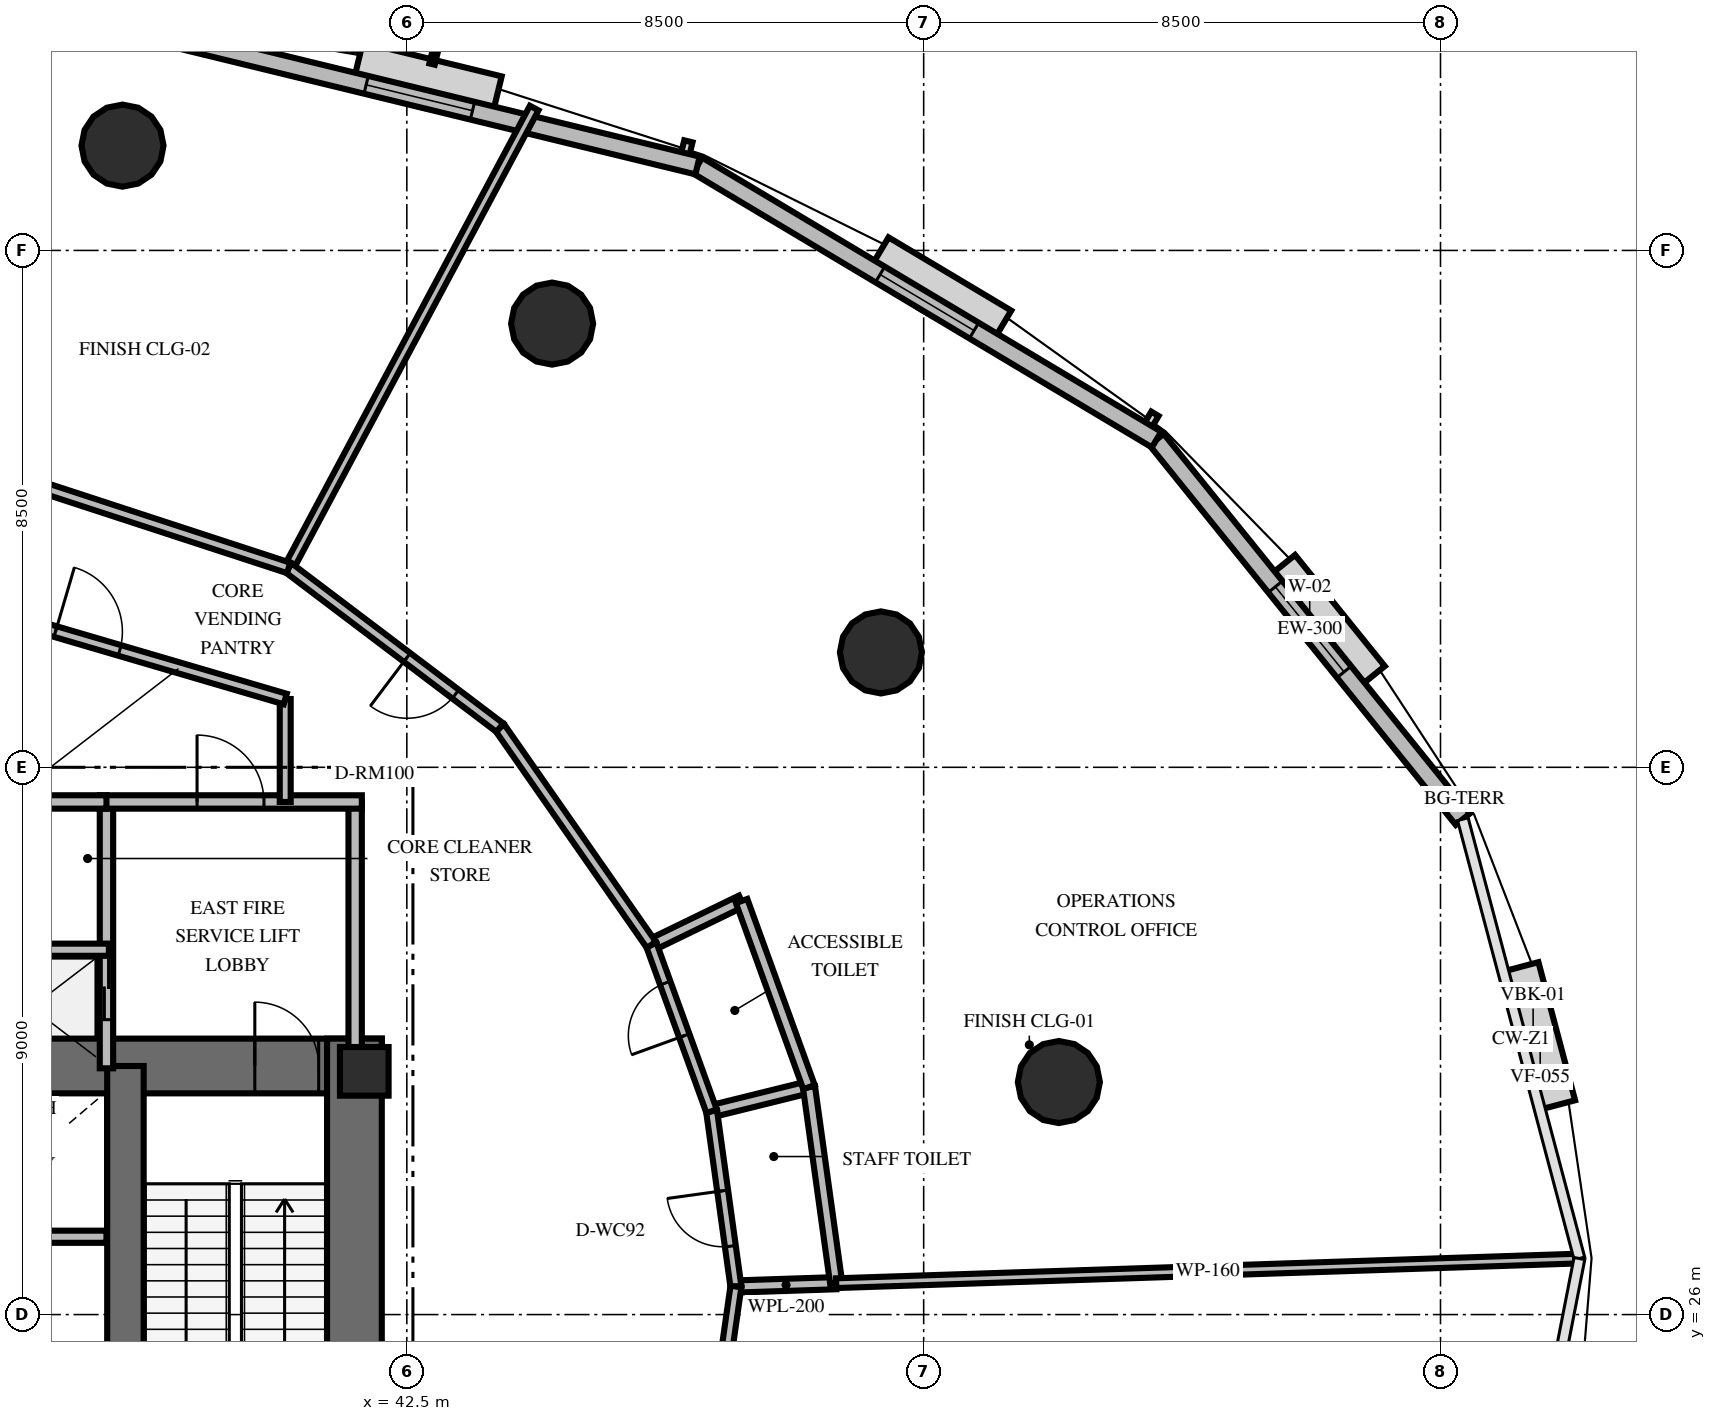
"""IFC4 building model, lengths in metres.
Left out: names, types, materials, properties, quantities, classifications, styles, units other than length and angle.
Written with IfcOpenShell. Run it as: python <this file> out.ifc"""

import sys

from ifc_helpers import new_model, si_unit, direction, frame, frame_2d, origin, origin_2d, place, context, subcontext, project, spatial, rectangle, circle, extrude, element, fill, save


model = new_model("IFC4")
c1 = context("Model", 3, precision=1e-05, world=origin(), true_north=direction((0.0, 1.0)))
c2 = subcontext(c1, "Body", "Model", "MODEL_VIEW")
j1 = project(units=[si_unit("LENGTHUNIT", "METRE"), si_unit("PLANEANGLEUNIT", "RADIAN")], contexts=[c1])
p1 = place(None, origin())
s1 = spatial("IfcSite", under=j1, at=p1, CompositionType="ELEMENT")
p2 = place(p1, origin())
s2 = spatial("IfcBuilding", under=s1, at=p2, CompositionType="ELEMENT")
p3 = place(p2, frame((0.0, 0.0, 38.4)))
s3 = spatial("IfcBuildingStorey", under=s2, at=p3, CompositionType="ELEMENT", Elevation=38.4)
p4 = place(p3, frame((25.922, 30.088, 0.0), z_axis=(0.0, 0.0, 1.0), x_axis=(1.0, 0.0, 0.0)))
e1 = element("IfcWall", 1, at=p4, inside=s3, PredefinedType="SHEAR", context=c2, shape_type="SweptSolid", body=[
    extrude(rectangle(XDim=16.166, YDim=0.9, at=frame_2d((8.083, 0.0))), origin(), (0.0, 0.0, 1.0), 4.2),
])
p5 = place(p4, frame((1.028, 0.0, 0.0)))
e2 = element("IfcOpeningElement", 2, at=p5, cuts=e1, PredefinedType="OPENING", context=c2, shape_type="SweptSolid", body=[
    extrude(rectangle(XDim=1.05, YDim=2.15, at=frame_2d((0.525, 1.075))), frame((0.0, 0.46, 0.0), z_axis=(0.0, -1.0, 0.0), x_axis=(1.0, 0.0, 0.0)), (0.0, 0.0, 1.0), 0.92),
])
p6 = place(p4, frame((14.078, 0.0, 0.0)))
e3 = element("IfcOpeningElement", 3, at=p6, cuts=e1, PredefinedType="OPENING", context=c2, shape_type="SweptSolid", body=[
    extrude(rectangle(XDim=1.05, YDim=2.15, at=frame_2d((0.525, 1.075))), frame((0.0, 0.46, 0.0), z_axis=(0.0, -1.0, 0.0), x_axis=(1.0, 0.0, 0.0)), (0.0, 0.0, 1.0), 0.92),
])
p7 = place(p4, frame((7.528, 0.0, 0.0)))
e4 = element("IfcOpeningElement", 4, at=p7, cuts=e1, PredefinedType="OPENING", context=c2, shape_type="SweptSolid", body=[
    extrude(rectangle(XDim=1.1, YDim=2.15, at=frame_2d((0.55, 1.075))), frame((0.0, 0.46, 0.0), z_axis=(0.0, -1.0, 0.0), x_axis=(1.0, 0.0, 0.0)), (0.0, 0.0, 1.0), 0.92),
])
p8 = place(p3, frame((41.638, 19.662, 0.0), z_axis=(0.0, 0.0, 1.0), x_axis=(0.0, 1.0, 0.0)))
e5 = element("IfcWall", 5, at=p8, inside=s3, PredefinedType="SHEAR", context=c2, shape_type="SweptSolid", body=[
    extrude(rectangle(XDim=10.876, YDim=0.9, at=frame_2d((5.438, 0.0))), origin(), (0.0, 0.0, 1.0), 4.2),
])
p9 = place(p3, frame((37.872, 20.112, 0.0), z_axis=(0.0, 0.0, 1.0), x_axis=(0.0, 1.0, 0.0)))
e6 = element("IfcWall", 6, at=p9, inside=s3, PredefinedType="SHEAR", context=c2, shape_type="SweptSolid", body=[
    extrude(rectangle(XDim=9.976, YDim=0.6, at=frame_2d((4.988, 0.0))), origin(), (0.0, 0.0, 1.0), 4.2),
])
p10 = place(p3, frame((41.8, 30.0, 0.0), z_axis=(0.0, 0.0, 1.0), x_axis=(1.0, 0.0, 0.0)))
e7 = element("IfcColumn", 7, at=p10, inside=s3, PredefinedType="PILASTER", context=c2, shape_type="SweptSolid", body=[
    extrude(rectangle(XDim=0.8, YDim=0.8, at=origin_2d()), origin(), (0.0, 0.0, 1.0), 4.2),
])
for number, where, z_axis, x_axis in (
    (8, (53.223, 29.824, 0.0), (0.0, 0.0, 1.0), (1.0, 0.0, 0.0)),
    (9, (50.297, 36.889, 0.0), (0.0, 0.0, 1.0), (1.0, 0.0, 0.0)),
    (10, (44.889, 42.297, 0.0), (0.0, 0.0, 1.0), (1.0, 0.0, 0.0)),
    (11, (37.824, 45.223, 0.0), (0.0, 0.0, 1.0), (1.0, 0.0, 0.0)),
):
    element("IfcColumn", number, at=place(p3, frame(where, z_axis=z_axis, x_axis=x_axis)), inside=s3, PredefinedType="COLUMN", context=c2, shape_type="SweptSolid", body=[
        extrude(circle(Radius=0.675, at=origin_2d()), origin(), (0.0, 0.0, 1.0), 4.2),
    ])
p11 = place(p3, frame((59.868, 34.147, 0.0), z_axis=(0.0, 0.0, 1.0), x_axis=(-0.627974320343, 0.778234060543, 0.0)))
e12 = element("IfcWall", 12, at=p11, inside=s3, PredefinedType="SOLIDWALL", context=c2, shape_type="SweptSolid", body=[
    extrude(rectangle(XDim=8.021, YDim=0.3, at=frame_2d((4.011, 0.0))), origin(), (0.0, 0.0, 1.0), 3.0),
])
p12 = place(p11, frame((3.111, 0.0, 0.8)))
e13 = element("IfcOpeningElement", 13, at=p12, cuts=e12, PredefinedType="OPENING", context=c2, shape_type="SweptSolid", body=[
    extrude(rectangle(XDim=1.8, YDim=1.95, at=frame_2d((0.9, 0.975))), frame((0.0, 0.16, 0.0), z_axis=(0.0, -1.0, 0.0), x_axis=(1.0, 0.0, 0.0)), (0.0, 0.0, 1.0), 0.32),
])
p13 = place(p3, frame((54.83, 40.39, 0.0), z_axis=(0.0, 0.0, 1.0), x_axis=(-0.85861541015, 0.512620305345, 0.0)))
e14 = element("IfcWall", 14, at=p13, inside=s3, PredefinedType="SOLIDWALL", context=c2, shape_type="SweptSolid", body=[
    extrude(rectangle(XDim=8.793, YDim=0.3, at=frame_2d((4.396, 0.0))), origin(), (0.0, 0.0, 1.0), 3.0),
])
p14 = place(p13, frame((3.496, 0.0, 0.8)))
e15 = element("IfcOpeningElement", 15, at=p14, cuts=e14, PredefinedType="OPENING", context=c2, shape_type="SweptSolid", body=[
    extrude(rectangle(XDim=1.8, YDim=1.95, at=frame_2d((0.9, 0.975))), frame((0.0, 0.16, 0.0), z_axis=(0.0, -1.0, 0.0), x_axis=(1.0, 0.0, 0.0)), (0.0, 0.0, 1.0), 0.32),
])
p15 = place(p3, frame((47.281, 44.897, 0.0), z_axis=(0.0, 0.0, 1.0), x_axis=(-0.971624307671, 0.236529500787, 0.0)))
e16 = element("IfcWall", 16, at=p15, inside=s3, PredefinedType="SOLIDWALL", context=c2, shape_type="SweptSolid", body=[
    extrude(rectangle(XDim=9.419, YDim=0.3, at=frame_2d((4.709, 0.0))), origin(), (0.0, 0.0, 1.0), 3.0),
])
p16 = place(p15, frame((3.809, 0.0, 0.8)))
e17 = element("IfcOpeningElement", 17, at=p16, cuts=e16, PredefinedType="OPENING", context=c2, shape_type="SweptSolid", body=[
    extrude(rectangle(XDim=1.8, YDim=1.95, at=frame_2d((0.9, 0.975))), frame((0.0, 0.16, 0.0), z_axis=(0.0, -1.0, 0.0), x_axis=(1.0, 0.0, 0.0)), (0.0, 0.0, 1.0), 0.32),
])
p17 = place(p3, frame((38.129, 47.125, 0.0), z_axis=(0.0, 0.0, 1.0), x_axis=(-0.99944952804, -0.033175908432, 0.0)))
e18 = element("IfcWall", 18, at=p17, inside=s3, PredefinedType="SOLIDWALL", context=c2, shape_type="SweptSolid", body=[
    extrude(rectangle(XDim=9.655, YDim=0.3, at=frame_2d((4.828, 0.0))), origin(), (0.0, 0.0, 1.0), 3.0),
])
p18 = place(p17, frame((3.63, 0.0, 0.0)))
e19 = element("IfcOpeningElement", 19, at=p18, cuts=e18, PredefinedType="OPENING", context=c2, shape_type="SweptSolid", body=[
    extrude(rectangle(XDim=1.05, YDim=2.15, at=frame_2d((0.525, 1.075))), frame((0.0, 0.16, 0.0), z_axis=(0.0, -1.0, 0.0), x_axis=(1.0, 0.0, 0.0)), (0.0, 0.0, 1.0), 0.32),
])
p19 = place(p3, frame((37.56, 30.05, 0.0), z_axis=(0.0, 0.0, 1.0), x_axis=(0.0, 1.0, 0.0)))
e20 = element("IfcWall", 20, at=p19, inside=s3, PredefinedType="SOLIDWALL", context=c2, shape_type="SweptSolid", body=[
    extrude(rectangle(XDim=4.38, YDim=0.22, at=frame_2d((2.19, 0.0))), origin(), (0.0, 0.0, 1.0), 3.0),
])
p20 = place(p19, frame((0.8, 0.0, 0.0)))
e21 = element("IfcOpeningElement", 21, at=p20, cuts=e20, PredefinedType="OPENING", context=c2, shape_type="SweptSolid", body=[
    extrude(rectangle(XDim=1.05, YDim=2.1, at=frame_2d((0.525, 1.05))), frame((0.0, 0.12, 0.0), z_axis=(0.0, -1.0, 0.0), x_axis=(1.0, 0.0, 0.0)), (0.0, 0.0, 1.0), 0.24),
])
p21 = place(p3, frame((41.65, 30.05, 0.0), z_axis=(0.0, 0.0, 1.0), x_axis=(0.0, 1.0, 0.0)))
e22 = element("IfcWall", 22, at=p21, inside=s3, PredefinedType="SOLIDWALL", context=c2, shape_type="SweptSolid", body=[
    extrude(rectangle(XDim=4.38, YDim=0.22, at=frame_2d((2.19, 0.0))), origin(), (0.0, 0.0, 1.0), 3.0),
])
p22 = place(p3, frame((37.45, 34.43, 0.0), z_axis=(0.0, 0.0, 1.0), x_axis=(1.0, 0.0, 0.0)))
e23 = element("IfcWall", 23, at=p22, inside=s3, PredefinedType="SOLIDWALL", context=c2, shape_type="SweptSolid", body=[
    extrude(rectangle(XDim=4.31, YDim=0.22, at=frame_2d((2.155, 0.0))), origin(), (0.0, 0.0, 1.0), 3.0),
])
p23 = place(p22, frame((1.6, 0.0, 0.0)))
e24 = element("IfcOpeningElement", 24, at=p23, cuts=e23, PredefinedType="OPENING", context=c2, shape_type="SweptSolid", body=[
    extrude(rectangle(XDim=1.1, YDim=2.15, at=frame_2d((0.55, 1.075))), frame((0.0, 0.12, 0.0), z_axis=(0.0, -1.0, 0.0), x_axis=(1.0, 0.0, 0.0)), (0.0, 0.0, 1.0), 0.24),
])
p24 = place(p3, frame((35.05, 32.0, 0.0), z_axis=(0.0, 0.0, 1.0), x_axis=(1.0, 0.0, 0.0)))
e25 = element("IfcWall", 25, at=p24, inside=s3, PredefinedType="SOLIDWALL", context=c2, shape_type="SweptSolid", body=[
    extrude(rectangle(XDim=2.55, YDim=0.2, at=frame_2d((1.275, 0.0))), origin(), (0.0, 0.0, 1.0), 3.0),
])
p25 = place(p3, frame((30.44, 34.43, 0.0), z_axis=(0.0, 0.0, 1.0), x_axis=(1.0, 0.0, 0.0)))
e26 = element("IfcWall", 26, at=p25, inside=s3, PredefinedType="SOLIDWALL", context=c2, shape_type="SweptSolid", body=[
    extrude(rectangle(XDim=7.12, YDim=0.22, at=frame_2d((3.56, 0.0))), origin(), (0.0, 0.0, 1.0), 3.0),
])
p26 = place(p25, frame((3.01, 0.0, 0.0)))
e27 = element("IfcOpeningElement", 27, at=p26, cuts=e26, PredefinedType="OPENING", context=c2, shape_type="SweptSolid", body=[
    extrude(rectangle(XDim=1.1, YDim=2.15, at=frame_2d((0.55, 1.075))), frame((0.0, 0.12, 0.0), z_axis=(0.0, -1.0, 0.0), x_axis=(1.0, 0.0, 0.0)), (0.0, 0.0, 1.0), 0.24),
])
p27 = place(p3, frame((34.75, 27.28, 0.0), z_axis=(0.0, 0.0, 1.0), x_axis=(1.0, 0.0, 0.0)))
e28 = element("IfcWall", 28, at=p27, inside=s3, PredefinedType="SOLIDWALL", context=c2, shape_type="SweptSolid", body=[
    extrude(rectangle(XDim=2.81, YDim=0.2, at=frame_2d((1.405, 0.0))), origin(), (0.0, 0.0, 1.0), 3.0),
])
p28 = place(p3, frame((40.5, 36.123, 0.0), z_axis=(0.0, 0.0, 1.0), x_axis=(0.0, -1.0, 0.0)))
e29 = element("IfcWall", 29, at=p28, inside=s3, PredefinedType="PARTITIONING", context=c2, shape_type="SweptSolid", body=[
    extrude(rectangle(XDim=1.693, YDim=0.18, at=frame_2d((0.846, 0.0))), origin(), (0.0, 0.0, 1.0), 3.0),
])
p29 = place(p3, frame((34.0, 38.03, 0.0), z_axis=(0.0, 0.0, 1.0), x_axis=(0.959546654541, -0.281549671923, 0.0)))
e30 = element("IfcWall", 30, at=p29, inside=s3, PredefinedType="PARTITIONING", context=c2, shape_type="SweptSolid", body=[
    extrude(rectangle(XDim=6.774, YDim=0.18, at=frame_2d((3.387, 0.0))), origin(), (0.0, 0.0, 1.0), 3.0),
])
p30 = place(p29, frame((2.837, 0.0, 0.0)))
e31 = element("IfcOpeningElement", 31, at=p30, cuts=e30, PredefinedType="OPENING", context=c2, shape_type="SweptSolid", body=[
    extrude(rectangle(XDim=1.1, YDim=2.15, at=frame_2d((0.55, 1.075))), frame((0.0, 0.1, 0.0), z_axis=(0.0, -1.0, 0.0), x_axis=(1.0, 0.0, 0.0)), (0.0, 0.0, 1.0), 0.2),
])
for number, where, z_axis, x_axis in (
    (32, (47.912, 26.461, 0.0), (0.0, 0.0, 1.0), (0.999, 0.033, 0.0)),
    (33, (47.512, 29.344, 0.0), (0.0, 0.0, 1.0), (0.971, 0.24, 0.0)),
):
    element("IfcWall", number, at=place(p3, frame(where, z_axis=z_axis, x_axis=x_axis)), inside=s3, PredefinedType="PLUMBINGWALL", context=c2, shape_type="SweptSolid", body=[
        extrude(rectangle(XDim=1.65, YDim=0.2, at=frame_2d((0.825, 0.0))), origin(), (0.0, 0.0, 1.0), 3.0),
    ])
p31 = place(p3, frame((49.561, 26.516, 0.0), z_axis=(0.0, 0.0, 1.0), x_axis=(-0.13739872662, 0.990515820128, 0.0)))
e34 = element("IfcWall", 34, at=p31, inside=s3, PredefinedType="PLUMBINGWALL", context=c2, shape_type="SweptSolid", body=[
    extrude(rectangle(XDim=3.255, YDim=0.2, at=frame_2d((1.627, 0.0))), origin(), (0.0, 0.0, 1.0), 3.0),
])
p32 = place(p3, frame((47.912, 26.461, 0.0), z_axis=(0.0, 0.0, 1.0), x_axis=(-0.137415192003, 0.990513536004, 0.0)))
e35 = element("IfcWall", 35, at=p32, inside=s3, PredefinedType="PARTITIONING", context=c2, shape_type="SweptSolid", body=[
    extrude(rectangle(XDim=2.91, YDim=0.18, at=frame_2d((1.455, 0.0))), origin(), (0.0, 0.0, 1.0), 3.0),
])
p33 = place(p32, frame((0.669, 0.0, 0.0)))
e36 = element("IfcOpeningElement", 36, at=p33, cuts=e35, PredefinedType="OPENING", context=c2, shape_type="SweptSolid", body=[
    extrude(rectangle(XDim=0.92, YDim=2.1, at=frame_2d((0.46, 1.05))), frame((0.0, 0.1, 0.0), z_axis=(0.0, -1.0, 0.0), x_axis=(1.0, 0.0, 0.0)), (0.0, 0.0, 1.0), 0.2),
])
p34 = place(p3, frame((46.522, 32.08, 0.0), z_axis=(0.0, 0.0, 1.0), x_axis=(0.899574601485, 0.436767142037, 0.0)))
e37 = element("IfcWall", 37, at=p34, inside=s3, PredefinedType="PLUMBINGWALL", context=c2, shape_type="SweptSolid", body=[
    extrude(rectangle(XDim=1.65, YDim=0.2, at=frame_2d((0.825, 0.0))), origin(), (0.0, 0.0, 1.0), 3.0),
])
p35 = place(p3, frame((49.114, 29.74, 0.0), z_axis=(0.0, 0.0, 1.0), x_axis=(-0.340381629305, 0.940287374387, 0.0)))
e38 = element("IfcWall", 38, at=p35, inside=s3, PredefinedType="PLUMBINGWALL", context=c2, shape_type="SweptSolid", body=[
    extrude(rectangle(XDim=3.255, YDim=0.2, at=frame_2d((1.627, 0.0))), origin(), (0.0, 0.0, 1.0), 3.0),
])
p36 = place(p3, frame((47.512, 29.344, 0.0), z_axis=(0.0, 0.0, 1.0), x_axis=(-0.340435968469, 0.940267701972, 0.0)))
e39 = element("IfcWall", 39, at=p36, inside=s3, PredefinedType="PARTITIONING", context=c2, shape_type="SweptSolid", body=[
    extrude(rectangle(XDim=2.91, YDim=0.18, at=frame_2d((1.455, 0.0))), origin(), (0.0, 0.0, 1.0), 3.0),
])
p37 = place(p36, frame((1.321, 0.0, 0.0)))
e40 = element("IfcOpeningElement", 40, at=p37, cuts=e39, PredefinedType="OPENING", context=c2, shape_type="SweptSolid", body=[
    extrude(rectangle(XDim=0.92, YDim=2.1, at=frame_2d((0.46, 1.05))), frame((0.0, 0.1, 0.0), z_axis=(0.0, -1.0, 0.0), x_axis=(1.0, 0.0, 0.0)), (0.0, 0.0, 1.0), 0.2),
])
p38 = place(p3, frame((49.561, 26.516, 0.0), z_axis=(0.0, 0.0, 1.0), x_axis=(0.999450145457, 0.033157303046, 0.0)))
e41 = element("IfcWall", 41, at=p38, inside=s3, PredefinedType="PARTITIONING", context=c2, shape_type="SweptSolid", body=[
    extrude(rectangle(XDim=12.23, YDim=0.16, at=frame_2d((6.115, 0.0))), origin(), (0.0, 0.0, 1.0), 3.0),
])
p39 = place(p3, frame((40.556, 38.279, 0.0), z_axis=(0.0, 0.0, 1.0), x_axis=(0.471021282729, 0.882121846015, 0.0)))
e42 = element("IfcWall", 42, at=p39, inside=s3, PredefinedType="PARTITIONING", context=c2, shape_type="SweptSolid", body=[
    extrude(rectangle(XDim=8.573, YDim=0.16, at=frame_2d((4.286, 0.0))), origin(), (0.0, 0.0, 1.0), 3.0),
])
p40 = place(p3, frame((46.522, 32.08, 0.0), z_axis=(0.0, 0.0, 1.0), x_axis=(-0.572144766155, 0.820152648329, 0.0)))
e43 = element("IfcWall", 43, at=p40, inside=s3, PredefinedType="PARTITIONING", context=c2, shape_type="SweptSolid", body=[
    extrude(rectangle(XDim=4.355, YDim=0.18, at=frame_2d((2.177, 0.0))), origin(), (0.0, 0.0, 1.0), 3.0),
])
p41 = place(p3, frame((44.03, 35.652, 0.0), z_axis=(0.0, 0.0, 1.0), x_axis=(-0.797571843353, 0.603223967271, 0.0)))
e44 = element("IfcWall", 44, at=p41, inside=s3, PredefinedType="PARTITIONING", context=c2, shape_type="SweptSolid", body=[
    extrude(rectangle(XDim=4.355, YDim=0.18, at=frame_2d((2.178, 0.0))), origin(), (0.0, 0.0, 1.0), 3.0),
])
p42 = place(p41, frame((0.914, 0.0, 0.0)))
e45 = element("IfcOpeningElement", 45, at=p42, cuts=e44, PredefinedType="OPENING", context=c2, shape_type="SweptSolid", body=[
    extrude(rectangle(XDim=1.0, YDim=2.15, at=frame_2d((0.5, 1.075))), frame((0.0, 0.1, 0.0), z_axis=(0.0, -1.0, 0.0), x_axis=(1.0, 0.0, 0.0)), (0.0, 0.0, 1.0), 0.2),
])
for number, where, z_axis, x_axis in (
    (46, (40.556, 38.279, 0.0), (0.0, 0.0, 1.0), (-0.951, 0.311, 0.0)),
    (47, (47.231, 21.675, 0.0), (0.0, 0.0, 1.0), (0.141, 0.99, 0.0)),
):
    element("IfcWall", number, at=place(p3, frame(where, z_axis=z_axis, x_axis=x_axis)), inside=s3, PredefinedType="PARTITIONING", context=c2, shape_type="SweptSolid", body=[
        extrude(rectangle(XDim=4.834, YDim=0.18, at=frame_2d((2.417, 0.0))), origin(), (0.0, 0.0, 1.0), 3.0),
    ])
p43 = place(p12, origin())
e48 = element("IfcWindow", 48, at=p43, inside=s3, PartitioningType="SINGLE_PANEL", PredefinedType="WINDOW", context=c2, shape_type="SweptSolid", body=[
    extrude(rectangle(XDim=1.8, YDim=1.95, at=frame_2d((0.9, 0.975))), frame((0.0, 0.03, 0.0), z_axis=(0.0, -1.0, 0.0), x_axis=(1.0, 0.0, 0.0)), (0.0, 0.0, 1.0), 0.06),
])
fill(e13, e48)
p44 = place(p14, origin())
e49 = element("IfcWindow", 49, at=p44, inside=s3, PartitioningType="SINGLE_PANEL", PredefinedType="WINDOW", context=c2, shape_type="SweptSolid", body=[
    extrude(rectangle(XDim=1.8, YDim=1.95, at=frame_2d((0.9, 0.975))), frame((0.0, 0.03, 0.0), z_axis=(0.0, -1.0, 0.0), x_axis=(1.0, 0.0, 0.0)), (0.0, 0.0, 1.0), 0.06),
])
fill(e15, e49)
p45 = place(p16, origin())
e50 = element("IfcWindow", 50, at=p45, inside=s3, PartitioningType="SINGLE_PANEL", PredefinedType="WINDOW", context=c2, shape_type="SweptSolid", body=[
    extrude(rectangle(XDim=1.8, YDim=1.95, at=frame_2d((0.9, 0.975))), frame((0.0, 0.03, 0.0), z_axis=(0.0, -1.0, 0.0), x_axis=(1.0, 0.0, 0.0)), (0.0, 0.0, 1.0), 0.06),
])
fill(e17, e50)
p46 = place(p6, origin())
e51 = element("IfcDoor", 51, at=p46, inside=s3, OperationType="SINGLE_SWING_LEFT", PredefinedType="DOOR", context=c2, shape_type="SweptSolid", body=[
    extrude(rectangle(XDim=1.05, YDim=2.15, at=frame_2d((0.525, 1.075))), frame((0.0, 0.025, 0.0), z_axis=(0.0, -1.0, 0.0), x_axis=(1.0, 0.0, 0.0)), (0.0, 0.0, 1.0), 0.05),
])
fill(e3, e51)
p47 = place(p23, origin())
e52 = element("IfcDoor", 52, at=p47, inside=s3, OperationType="SINGLE_SWING_LEFT", PredefinedType="DOOR", context=c2, shape_type="SweptSolid", body=[
    extrude(rectangle(XDim=1.1, YDim=2.15, at=frame_2d((0.55, 1.075))), frame((0.0, 0.025, 0.0), z_axis=(0.0, -1.0, 0.0), x_axis=(1.0, 0.0, 0.0)), (0.0, 0.0, 1.0), 0.05),
])
fill(e24, e52)
p48 = place(p20, origin())
e53 = element("IfcDoor", 53, at=p48, inside=s3, OperationType="DOUBLE_DOOR_SLIDING", PredefinedType="USERDEFINED", context=c2, shape_type="SweptSolid", body=[
    extrude(rectangle(XDim=1.05, YDim=2.1, at=frame_2d((0.525, 1.05))), frame((0.0, 0.025, 0.0), z_axis=(0.0, -1.0, 0.0), x_axis=(1.0, 0.0, 0.0)), (0.0, 0.0, 1.0), 0.05),
])
fill(e21, e53)
p49 = place(p30, origin())
e54 = element("IfcDoor", 54, at=p49, inside=s3, OperationType="SINGLE_SWING_LEFT", PredefinedType="DOOR", context=c2, shape_type="SweptSolid", body=[
    extrude(rectangle(XDim=1.1, YDim=2.15, at=frame_2d((0.55, 1.075))), frame((0.0, 0.025, 0.0), z_axis=(0.0, -1.0, 0.0), x_axis=(1.0, 0.0, 0.0)), (0.0, 0.0, 1.0), 0.05),
])
fill(e31, e54)
p50 = place(p33, origin())
e55 = element("IfcDoor", 55, at=p50, inside=s3, OperationType="SINGLE_SWING_RIGHT", PredefinedType="DOOR", context=c2, shape_type="SweptSolid", body=[
    extrude(rectangle(XDim=0.92, YDim=2.1, at=frame_2d((0.46, 1.05))), frame((0.0, 0.025, 0.0), z_axis=(0.0, -1.0, 0.0), x_axis=(1.0, 0.0, 0.0)), (0.0, 0.0, 1.0), 0.05),
])
fill(e36, e55)
p51 = place(p37, origin())
e56 = element("IfcDoor", 56, at=p51, inside=s3, OperationType="SINGLE_SWING_LEFT", PredefinedType="DOOR", context=c2, shape_type="SweptSolid", body=[
    extrude(rectangle(XDim=0.92, YDim=2.1, at=frame_2d((0.46, 1.05))), frame((0.0, 0.025, 0.0), z_axis=(0.0, -1.0, 0.0), x_axis=(1.0, 0.0, 0.0)), (0.0, 0.0, 1.0), 0.05),
])
fill(e40, e56)
p52 = place(p42, origin())
e57 = element("IfcDoor", 57, at=p52, inside=s3, OperationType="SINGLE_SWING_RIGHT", PredefinedType="DOOR", context=c2, shape_type="SweptSolid", body=[
    extrude(rectangle(XDim=1.0, YDim=2.15, at=frame_2d((0.5, 1.075))), frame((0.0, 0.025, 0.0), z_axis=(0.0, -1.0, 0.0), x_axis=(1.0, 0.0, 0.0)), (0.0, 0.0, 1.0), 0.05),
])
fill(e45, e57)
save(model, sys.argv[1])
